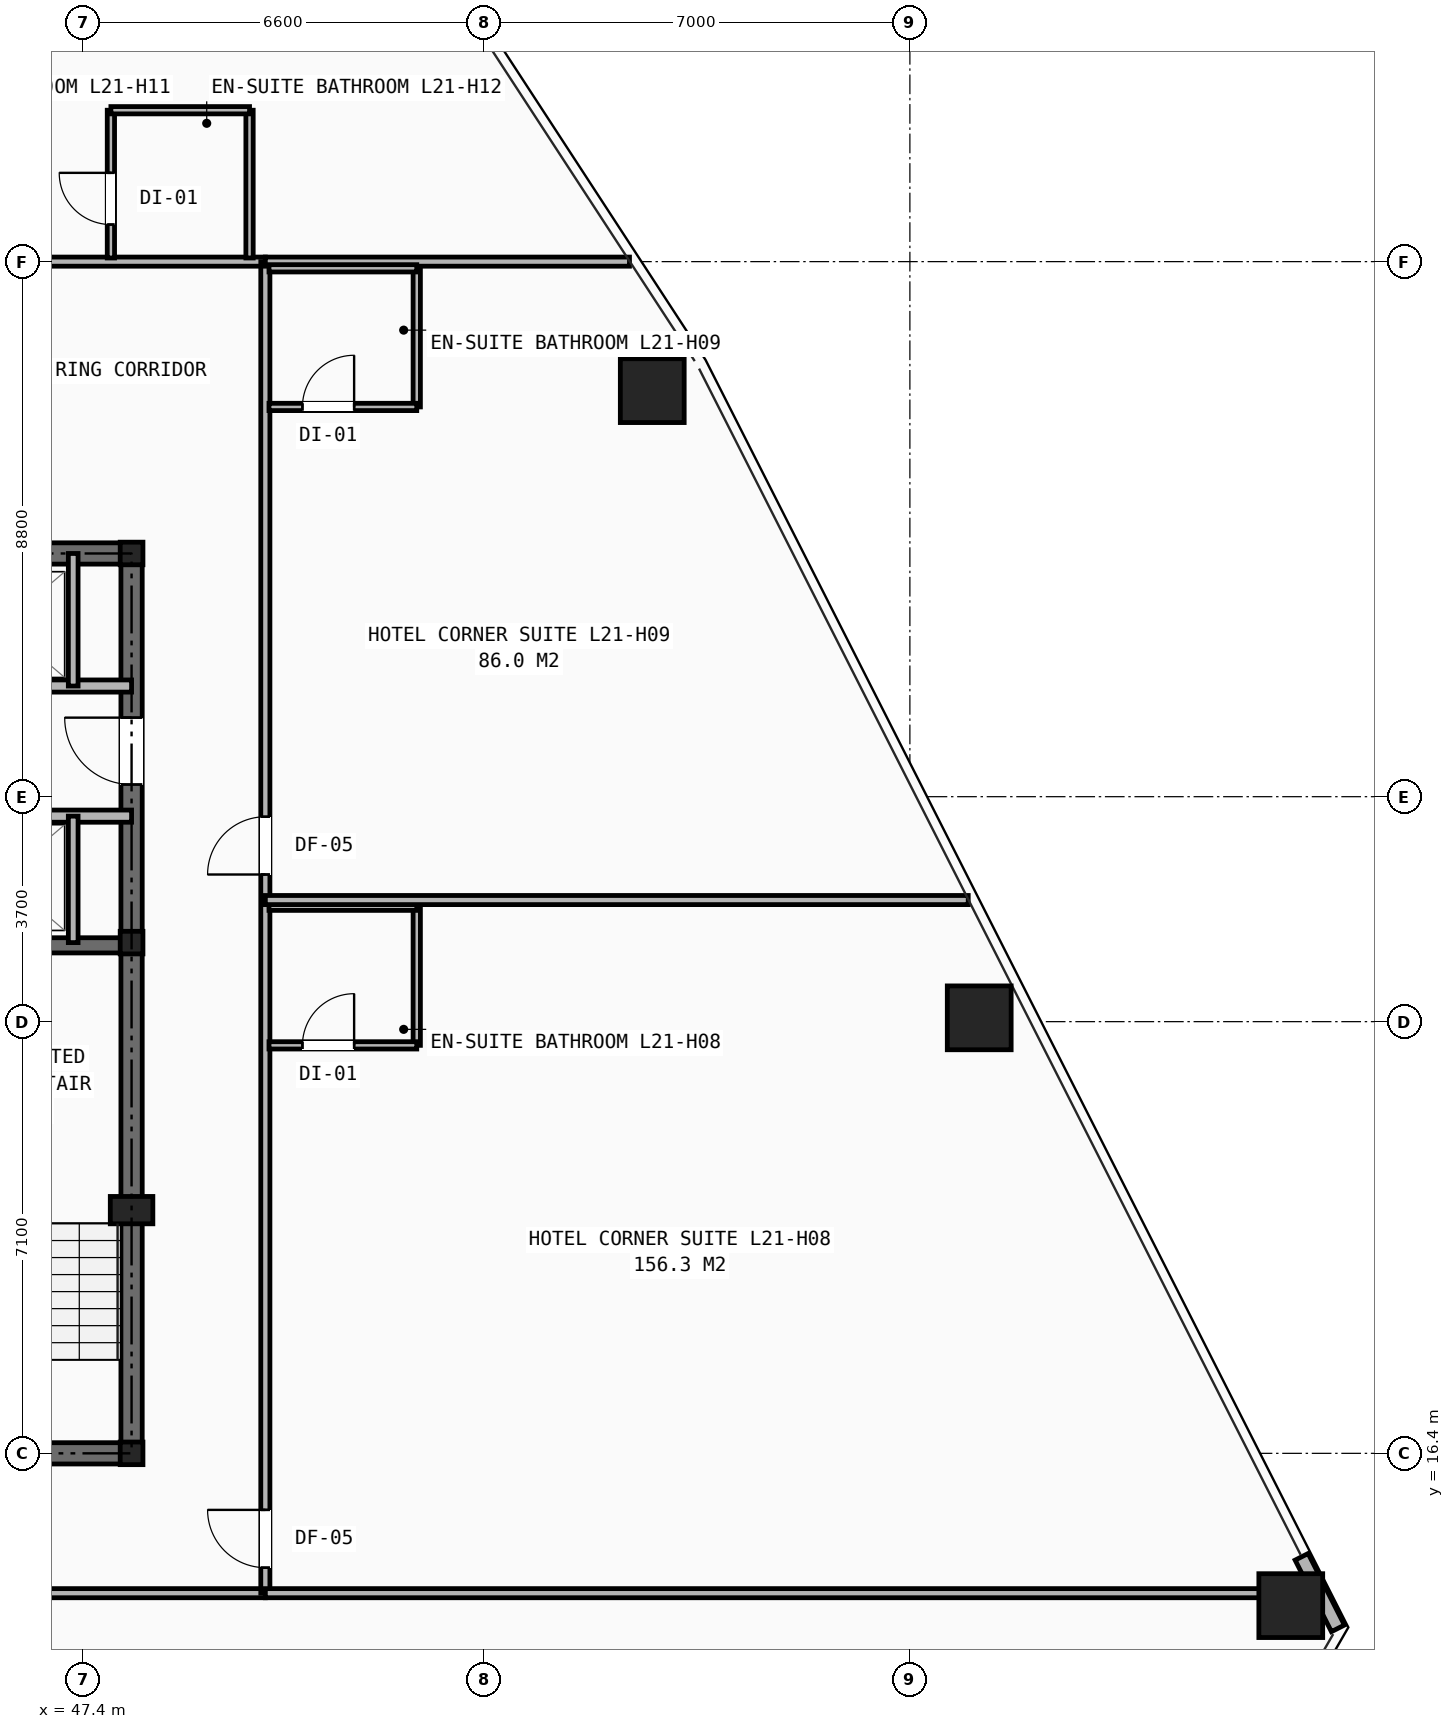
"""IFC4 building model, lengths in metres.
Left out: names, types, materials, properties, quantities, classifications, styles, units other than length and angle.
Written with IfcOpenShell. Run it as: python <this file> out.ifc"""

import sys

from ifc_helpers import new_model, si_unit, direction, frame, frame_2d, origin, origin_2d, place, context, subcontext, project, spatial, rectangle, hollow_rectangle, i_section, extrude, element, fill, save


model = new_model("IFC4")
c1 = context("Model", 3, precision=1e-05, world=origin(), true_north=direction((0.0, 1.0)))
c2 = subcontext(c1, "Body", "Model", "MODEL_VIEW")
j1 = project(units=[si_unit("LENGTHUNIT", "METRE"), si_unit("PLANEANGLEUNIT", "RADIAN")], contexts=[c1])
p1 = place(None, origin())
s1 = spatial("IfcSite", under=j1, at=p1, CompositionType="ELEMENT")
p2 = place(p1, origin())
s2 = spatial("IfcBuilding", under=s1, at=p2, CompositionType="ELEMENT")
p3 = place(p2, frame((0.0, 0.0, 76.6)))
s3 = spatial("IfcBuildingStorey", under=s2, at=p3, CompositionType="ELEMENT", Elevation=76.6)
for number, where, z_axis, x_axis in (
    (1, (48.2, 16.4, 0.0), (0.0, 0.0, 1.0), (1.0, 0.0, 0.0)),
    (2, (48.2, 24.8, 0.0), (0.0, 0.0, 1.0), (1.0, 0.0, 0.0)),
    (3, (48.2, 31.2, 0.0), (0.0, 0.0, 1.0), (1.0, 0.0, 0.0)),
):
    element("IfcColumn", number, at=place(p3, frame(where, z_axis=z_axis, x_axis=x_axis)), inside=s3, PredefinedType="COLUMN", context=c2, shape_type="SweptSolid", body=[
        extrude(i_section(OverallWidth=0.374, OverallDepth=0.372, WebThickness=0.016, FlangeThickness=0.026, at=origin_2d()), origin(), (0.0, 0.0, 1.0), 3.2),
    ])
p4 = place(p3, frame((48.2, 20.4, 0.0), z_axis=(0.0, 0.0, 1.0), x_axis=(1.0, 0.0, 0.0)))
e4 = element("IfcColumn", 4, at=p4, inside=s3, PredefinedType="PILASTER", context=c2, shape_type="SweptSolid", body=[
    extrude(rectangle(XDim=0.7, YDim=0.45, at=origin_2d()), origin(), (0.0, 0.0, 1.0), 3.2),
])
for number, where, z_axis, x_axis in (
    (5, (67.264, 13.896, 0.0), (0.0, 0.0, 1.0), (1.0, 0.0, 0.0)),
    (6, (62.14, 23.563, 0.0), (0.0, 0.0, 1.0), (1.0, 0.0, 0.0)),
    (7, (56.763, 33.878, 0.0), (0.0, 0.0, 1.0), (1.0, 0.0, 0.0)),
):
    element("IfcColumn", number, at=place(p3, frame(where, z_axis=z_axis, x_axis=x_axis)), inside=s3, PredefinedType="COLUMN", context=c2, shape_type="SweptSolid", body=[
        extrude(hollow_rectangle(XDim=1.05, YDim=1.05, WallThickness=0.07, at=origin_2d()), origin(), (0.0, 0.0, 1.0), 3.2),
    ])
p5 = place(p3, frame((68.04, 13.521, 0.0), z_axis=(0.0, 0.0, 1.0), x_axis=(-0.452239623624, 0.891896475396, 0.0)))
e8 = element("IfcWall", 8, at=p5, inside=s3, PredefinedType="SHEAR", context=c2, shape_type="SweptSolid", body=[
    extrude(rectangle(XDim=1.319, YDim=0.24, at=frame_2d((0.66, 0.0))), origin(), (0.0, 0.0, 1.0), 2.253),
])
p6 = place(p3, frame((31.8, 16.4, 0.0), z_axis=(0.0, 0.0, 1.0), x_axis=(1.0, 0.0, 0.0)))
e9 = element("IfcWall", 9, at=p6, inside=s3, PredefinedType="SHEAR", context=c2, shape_type="SweptSolid", body=[
    extrude(rectangle(XDim=16.4, YDim=0.35, at=frame_2d((8.2, 0.0))), origin(), (0.0, 0.0, 1.0), 2.97),
])
p7 = place(p6, frame((7.75, 0.0, 0.0)))
e10 = element("IfcOpeningElement", 10, at=p7, cuts=e9, PredefinedType="OPENING", context=c2, shape_type="SweptSolid", body=[
    extrude(rectangle(XDim=0.9, YDim=2.1, at=frame_2d((0.45, 1.05))), frame((0.0, 0.185, 0.0), z_axis=(0.0, -1.0, 0.0), x_axis=(1.0, 0.0, 0.0)), (0.0, 0.0, 1.0), 0.37),
])
p8 = place(p6, frame((4.2, 0.0, 0.0)))
e11 = element("IfcOpeningElement", 11, at=p8, cuts=e9, PredefinedType="OPENING", context=c2, shape_type="SweptSolid", body=[
    extrude(rectangle(XDim=0.95, YDim=2.1, at=frame_2d((0.475, 1.05))), frame((0.0, 0.185, 0.0), z_axis=(0.0, -1.0, 0.0), x_axis=(1.0, 0.0, 0.0)), (0.0, 0.0, 1.0), 0.37),
])
p9 = place(p6, frame((10.6, 0.0, 0.0)))
e12 = element("IfcOpeningElement", 12, at=p9, cuts=e9, PredefinedType="OPENING", context=c2, shape_type="SweptSolid", body=[
    extrude(rectangle(XDim=0.95, YDim=2.1, at=frame_2d((0.475, 1.05))), frame((0.0, 0.185, 0.0), z_axis=(0.0, -1.0, 0.0), x_axis=(1.0, 0.0, 0.0)), (0.0, 0.0, 1.0), 0.37),
])
p10 = place(p3, frame((31.8, 31.2, 0.0), z_axis=(0.0, 0.0, 1.0), x_axis=(1.0, 0.0, 0.0)))
e13 = element("IfcWall", 13, at=p10, inside=s3, PredefinedType="SHEAR", context=c2, shape_type="SweptSolid", body=[
    extrude(rectangle(XDim=16.4, YDim=0.35, at=frame_2d((8.2, 0.0))), origin(), (0.0, 0.0, 1.0), 2.97),
])
p11 = place(p3, frame((48.2, 16.4, 0.0), z_axis=(0.0, 0.0, 1.0), x_axis=(0.0, 1.0, 0.0)))
e14 = element("IfcWall", 14, at=p11, inside=s3, PredefinedType="SHEAR", context=c2, shape_type="SweptSolid", body=[
    extrude(rectangle(XDim=14.8, YDim=0.35, at=frame_2d((7.4, 0.0))), origin(), (0.0, 0.0, 1.0), 2.97),
])
p12 = place(p11, frame((11.0, 0.0, 0.0)))
e15 = element("IfcOpeningElement", 15, at=p12, cuts=e14, PredefinedType="OPENING", context=c2, shape_type="SweptSolid", body=[
    extrude(rectangle(XDim=1.1, YDim=2.15, at=frame_2d((0.55, 1.075))), frame((0.0, 0.185, 0.0), z_axis=(0.0, -1.0, 0.0), x_axis=(1.0, 0.0, 0.0)), (0.0, 0.0, 1.0), 0.37),
])
p13 = place(p3, frame((44.955, 24.755, 0.0), z_axis=(0.0, 0.0, 1.0), x_axis=(1.0, 0.0, 0.0)))
e16 = element("IfcWall", 16, at=p13, inside=s3, PredefinedType="SHEAR", context=c2, shape_type="SweptSolid", body=[
    extrude(rectangle(XDim=3.245, YDim=0.25, at=frame_2d((1.623, 0.0))), origin(), (0.0, 0.0, 1.0), 2.97),
])
p14 = place(p3, frame((33.82, 29.02, 0.0), z_axis=(0.0, 0.0, 1.0), x_axis=(1.0, 0.0, 0.0)))
e17 = element("IfcWall", 17, at=p14, inside=s3, PredefinedType="SOLIDWALL", context=c2, shape_type="SweptSolid", body=[
    extrude(rectangle(XDim=14.38, YDim=0.2, at=frame_2d((7.19, 0.0))), origin(), (0.0, 0.0, 1.0), 2.421),
])
p15 = place(p14, frame((0.53, 0.0, 0.0)))
e18 = element("IfcOpeningElement", 18, at=p15, cuts=e17, PredefinedType="OPENING", context=c2, shape_type="SweptSolid", body=[
    extrude(rectangle(XDim=1.1, YDim=2.15, at=frame_2d((0.55, 1.075))), frame((0.0, 0.11, 0.0), z_axis=(0.0, -1.0, 0.0), x_axis=(1.0, 0.0, 0.0)), (0.0, 0.0, 1.0), 0.22),
])
p16 = place(p14, frame((2.69, 0.0, 0.0)))
e19 = element("IfcOpeningElement", 19, at=p16, cuts=e17, PredefinedType="OPENING", context=c2, shape_type="SweptSolid", body=[
    extrude(rectangle(XDim=1.1, YDim=2.15, at=frame_2d((0.55, 1.075))), frame((0.0, 0.11, 0.0), z_axis=(0.0, -1.0, 0.0), x_axis=(1.0, 0.0, 0.0)), (0.0, 0.0, 1.0), 0.22),
])
p17 = place(p14, frame((4.85, 0.0, 0.0)))
e20 = element("IfcOpeningElement", 20, at=p17, cuts=e17, PredefinedType="OPENING", context=c2, shape_type="SweptSolid", body=[
    extrude(rectangle(XDim=1.1, YDim=2.15, at=frame_2d((0.55, 1.075))), frame((0.0, 0.11, 0.0), z_axis=(0.0, -1.0, 0.0), x_axis=(1.0, 0.0, 0.0)), (0.0, 0.0, 1.0), 0.22),
])
p18 = place(p14, frame((7.01, 0.0, 0.0)))
e21 = element("IfcOpeningElement", 21, at=p18, cuts=e17, PredefinedType="OPENING", context=c2, shape_type="SweptSolid", body=[
    extrude(rectangle(XDim=1.1, YDim=2.15, at=frame_2d((0.55, 1.075))), frame((0.0, 0.11, 0.0), z_axis=(0.0, -1.0, 0.0), x_axis=(1.0, 0.0, 0.0)), (0.0, 0.0, 1.0), 0.22),
])
p19 = place(p3, frame((31.8, 26.88, 0.0), z_axis=(0.0, 0.0, 1.0), x_axis=(1.0, 0.0, 0.0)))
e22 = element("IfcWall", 22, at=p19, inside=s3, PredefinedType="SOLIDWALL", context=c2, shape_type="SweptSolid", body=[
    extrude(rectangle(XDim=16.4, YDim=0.2, at=frame_2d((8.2, 0.0))), origin(), (0.0, 0.0, 1.0), 2.421),
])
p20 = place(p19, frame((0.55, 0.0, 0.0)))
e23 = element("IfcOpeningElement", 23, at=p20, cuts=e22, PredefinedType="OPENING", context=c2, shape_type="SweptSolid", body=[
    extrude(rectangle(XDim=0.85, YDim=2.05, at=frame_2d((0.425, 1.025))), frame((0.0, 0.11, 0.0), z_axis=(0.0, -1.0, 0.0), x_axis=(1.0, 0.0, 0.0)), (0.0, 0.0, 1.0), 0.22),
])
p21 = place(p3, frame((47.24, 29.02, 0.0), z_axis=(0.0, 0.0, 1.0), x_axis=(0.0, 1.0, 0.0)))
e24 = element("IfcWall", 24, at=p21, inside=s3, PredefinedType="SOLIDWALL", context=c2, shape_type="SweptSolid", body=[
    extrude(rectangle(XDim=2.18, YDim=0.16, at=frame_2d((1.09, 0.0))), origin(), (0.0, 0.0, 1.0), 2.421),
])
p22 = place(p3, frame((47.24, 24.8, 0.0), z_axis=(0.0, 0.0, 1.0), x_axis=(0.0, 1.0, 0.0)))
e25 = element("IfcWall", 25, at=p22, inside=s3, PredefinedType="SOLIDWALL", context=c2, shape_type="SweptSolid", body=[
    extrude(rectangle(XDim=2.08, YDim=0.16, at=frame_2d((1.04, 0.0))), origin(), (0.0, 0.0, 1.0), 2.97),
])
p23 = place(p3, frame((29.6, 14.1, 0.0), z_axis=(0.0, 0.0, 1.0), x_axis=(1.0, 0.0, 0.0)))
e26 = element("IfcWall", 26, at=p23, inside=s3, PredefinedType="PARTITIONING", context=c2, shape_type="SweptSolid", body=[
    extrude(rectangle(XDim=20.8, YDim=0.15, at=frame_2d((10.4, 0.0))), origin(), (0.0, 0.0, 1.0), 2.421),
])
p24 = place(p23, frame((0.57, 0.0, 0.0)))
e27 = element("IfcOpeningElement", 27, at=p24, cuts=e26, PredefinedType="OPENING", context=c2, shape_type="SweptSolid", body=[
    extrude(rectangle(XDim=0.95, YDim=2.1, at=frame_2d((0.475, 1.05))), frame((0.0, 0.085, 0.0), z_axis=(0.0, -1.0, 0.0), x_axis=(1.0, 0.0, 0.0)), (0.0, 0.0, 1.0), 0.17),
])
p25 = place(p23, frame((5.82, 0.0, 0.0)))
e28 = element("IfcOpeningElement", 28, at=p25, cuts=e26, PredefinedType="OPENING", context=c2, shape_type="SweptSolid", body=[
    extrude(rectangle(XDim=0.95, YDim=2.1, at=frame_2d((0.475, 1.05))), frame((0.0, 0.085, 0.0), z_axis=(0.0, -1.0, 0.0), x_axis=(1.0, 0.0, 0.0)), (0.0, 0.0, 1.0), 0.17),
])
p26 = place(p23, frame((15.02, 0.0, 0.0)))
e29 = element("IfcOpeningElement", 29, at=p26, cuts=e26, PredefinedType="OPENING", context=c2, shape_type="SweptSolid", body=[
    extrude(rectangle(XDim=0.95, YDim=2.1, at=frame_2d((0.475, 1.05))), frame((0.0, 0.085, 0.0), z_axis=(0.0, -1.0, 0.0), x_axis=(1.0, 0.0, 0.0)), (0.0, 0.0, 1.0), 0.17),
])
p27 = place(p3, frame((40.75, 36.0, 0.0), z_axis=(0.0, 0.0, 1.0), x_axis=(1.0, 0.0, 0.0)))
e30 = element("IfcWall", 30, at=p27, inside=s3, PredefinedType="PARTITIONING", context=c2, shape_type="SweptSolid", body=[
    extrude(rectangle(XDim=9.65, YDim=0.15, at=frame_2d((4.825, 0.0))), origin(), (0.0, 0.0, 1.0), 2.503),
])
p28 = place(p27, frame((3.47, 0.0, 0.0)))
e31 = element("IfcOpeningElement", 31, at=p28, cuts=e30, PredefinedType="OPENING", context=c2, shape_type="SweptSolid", body=[
    extrude(rectangle(XDim=0.95, YDim=2.1, at=frame_2d((0.475, 1.05))), frame((0.0, 0.085, 0.0), z_axis=(0.0, -1.0, 0.0), x_axis=(1.0, 0.0, 0.0)), (0.0, 0.0, 1.0), 0.17),
])
p29 = place(p3, frame((50.4, 14.1, 0.0), z_axis=(0.0, 0.0, 1.0), x_axis=(0.0, 1.0, 0.0)))
e32 = element("IfcWall", 32, at=p29, inside=s3, PredefinedType="PARTITIONING", context=c2, shape_type="SweptSolid", body=[
    extrude(rectangle(XDim=21.9, YDim=0.15, at=frame_2d((10.95, 0.0))), origin(), (0.0, 0.0, 1.0), 2.421),
])
p30 = place(p29, frame((0.42, 0.0, 0.0)))
e33 = element("IfcOpeningElement", 33, at=p30, cuts=e32, PredefinedType="OPENING", context=c2, shape_type="SweptSolid", body=[
    extrude(rectangle(XDim=0.95, YDim=2.1, at=frame_2d((0.475, 1.05))), frame((0.0, 0.085, 0.0), z_axis=(0.0, -1.0, 0.0), x_axis=(1.0, 0.0, 0.0)), (0.0, 0.0, 1.0), 0.17),
])
p31 = place(p29, frame((11.82, 0.0, 0.0)))
e34 = element("IfcOpeningElement", 34, at=p31, cuts=e32, PredefinedType="OPENING", context=c2, shape_type="SweptSolid", body=[
    extrude(rectangle(XDim=0.95, YDim=2.1, at=frame_2d((0.475, 1.05))), frame((0.0, 0.085, 0.0), z_axis=(0.0, -1.0, 0.0), x_axis=(1.0, 0.0, 0.0)), (0.0, 0.0, 1.0), 0.17),
])
p32 = place(p3, frame((50.4, 14.1, 0.0), z_axis=(0.0, 0.0, 1.0), x_axis=(1.0, 0.0, 0.0)))
e35 = element("IfcWall", 35, at=p32, inside=s3, PredefinedType="PARTITIONING", context=c2, shape_type="SweptSolid", body=[
    extrude(rectangle(XDim=17.341, YDim=0.15, at=frame_2d((8.67, 0.0))), origin(), (0.0, 0.0, 1.0), 2.258),
])
p33 = place(p3, frame((50.4, 36.0, 0.0), z_axis=(0.0, 0.0, 1.0), x_axis=(1.0, 0.0, 0.0)))
e36 = element("IfcWall", 36, at=p33, inside=s3, PredefinedType="PARTITIONING", context=c2, shape_type="SweptSolid", body=[
    extrude(rectangle(XDim=5.989, YDim=0.15, at=frame_2d((2.994, 0.0))), origin(), (0.0, 0.0, 1.0), 2.258),
])
p34 = place(p3, frame((52.89, 23.11, 0.0), z_axis=(0.0, 0.0, 1.0), x_axis=(0.0, 1.0, 0.0)))
e37 = element("IfcWall", 37, at=p34, inside=s3, PredefinedType="PARTITIONING", context=c2, shape_type="SweptSolid", body=[
    extrude(rectangle(XDim=2.28, YDim=0.12, at=frame_2d((1.14, 0.0))), origin(), (0.0, 0.0, 1.0), 2.97),
])
p35 = place(p3, frame((50.46, 23.11, 0.0), z_axis=(0.0, 0.0, 1.0), x_axis=(1.0, 0.0, 0.0)))
e38 = element("IfcWall", 38, at=p35, inside=s3, PredefinedType="PARTITIONING", context=c2, shape_type="SweptSolid", body=[
    extrude(rectangle(XDim=2.43, YDim=0.12, at=frame_2d((1.215, 0.0))), origin(), (0.0, 0.0, 1.0), 2.97),
])
p36 = place(p35, frame((0.55, 0.0, 0.0)))
e39 = element("IfcOpeningElement", 39, at=p36, cuts=e38, PredefinedType="OPENING", context=c2, shape_type="SweptSolid", body=[
    extrude(rectangle(XDim=0.85, YDim=2.05, at=frame_2d((0.425, 1.025))), frame((0.0, 0.07, 0.0), z_axis=(0.0, -1.0, 0.0), x_axis=(1.0, 0.0, 0.0)), (0.0, 0.0, 1.0), 0.14),
])
p37 = place(p3, frame((50.46, 25.39, 0.0), z_axis=(0.0, 0.0, 1.0), x_axis=(1.0, 0.0, 0.0)))
e40 = element("IfcWall", 40, at=p37, inside=s3, PredefinedType="PARTITIONING", context=c2, shape_type="SweptSolid", body=[
    extrude(rectangle(XDim=2.43, YDim=0.12, at=frame_2d((1.215, 0.0))), origin(), (0.0, 0.0, 1.0), 2.97),
])
p38 = place(p3, frame((50.4, 25.5, 0.0), z_axis=(0.0, 0.0, 1.0), x_axis=(1.0, 0.0, 0.0)))
e41 = element("IfcWall", 41, at=p38, inside=s3, PredefinedType="PARTITIONING", context=c2, shape_type="SweptSolid", body=[
    extrude(rectangle(XDim=11.56, YDim=0.15, at=frame_2d((5.78, 0.0))), origin(), (0.0, 0.0, 1.0), 2.258),
])
p39 = place(p3, frame((52.89, 33.61, 0.0), z_axis=(0.0, 0.0, 1.0), x_axis=(0.0, 1.0, 0.0)))
e42 = element("IfcWall", 42, at=p39, inside=s3, PredefinedType="PARTITIONING", context=c2, shape_type="SweptSolid", body=[
    extrude(rectangle(XDim=2.28, YDim=0.12, at=frame_2d((1.14, 0.0))), origin(), (0.0, 0.0, 1.0), 2.97),
])
p40 = place(p3, frame((50.46, 33.61, 0.0), z_axis=(0.0, 0.0, 1.0), x_axis=(1.0, 0.0, 0.0)))
e43 = element("IfcWall", 43, at=p40, inside=s3, PredefinedType="PARTITIONING", context=c2, shape_type="SweptSolid", body=[
    extrude(rectangle(XDim=2.43, YDim=0.12, at=frame_2d((1.215, 0.0))), origin(), (0.0, 0.0, 1.0), 2.503),
])
p41 = place(p40, frame((0.55, 0.0, 0.0)))
e44 = element("IfcOpeningElement", 44, at=p41, cuts=e43, PredefinedType="OPENING", context=c2, shape_type="SweptSolid", body=[
    extrude(rectangle(XDim=0.85, YDim=2.05, at=frame_2d((0.425, 1.025))), frame((0.0, 0.07, 0.0), z_axis=(0.0, -1.0, 0.0), x_axis=(1.0, 0.0, 0.0)), (0.0, 0.0, 1.0), 0.14),
])
p42 = place(p3, frame((50.46, 35.89, 0.0), z_axis=(0.0, 0.0, 1.0), x_axis=(1.0, 0.0, 0.0)))
e45 = element("IfcWall", 45, at=p42, inside=s3, PredefinedType="PARTITIONING", context=c2, shape_type="SweptSolid", body=[
    extrude(rectangle(XDim=2.43, YDim=0.12, at=frame_2d((1.215, 0.0))), origin(), (0.0, 0.0, 1.0), 2.97),
])
p43 = place(p3, frame((47.86, 36.06, 0.0), z_axis=(0.0, 0.0, 1.0), x_axis=(0.0, 1.0, 0.0)))
e46 = element("IfcWall", 46, at=p43, inside=s3, PredefinedType="PARTITIONING", context=c2, shape_type="SweptSolid", body=[
    extrude(rectangle(XDim=2.43, YDim=0.12, at=frame_2d((1.215, 0.0))), origin(), (0.0, 0.0, 1.0), 2.503),
])
p44 = place(p43, frame((0.55, 0.0, 0.0)))
e47 = element("IfcOpeningElement", 47, at=p44, cuts=e46, PredefinedType="OPENING", context=c2, shape_type="SweptSolid", body=[
    extrude(rectangle(XDim=0.85, YDim=2.05, at=frame_2d((0.425, 1.025))), frame((0.0, 0.07, 0.0), z_axis=(0.0, -1.0, 0.0), x_axis=(1.0, 0.0, 0.0)), (0.0, 0.0, 1.0), 0.14),
])
p45 = place(p3, frame((50.14, 36.06, 0.0), z_axis=(0.0, 0.0, 1.0), x_axis=(0.0, 1.0, 0.0)))
e48 = element("IfcWall", 48, at=p45, inside=s3, PredefinedType="PARTITIONING", context=c2, shape_type="SweptSolid", body=[
    extrude(rectangle(XDim=2.43, YDim=0.12, at=frame_2d((1.215, 0.0))), origin(), (0.0, 0.0, 1.0), 2.503),
])
p46 = place(p3, frame((47.86, 38.49, 0.0), z_axis=(0.0, 0.0, 1.0), x_axis=(1.0, 0.0, 0.0)))
e49 = element("IfcWall", 49, at=p46, inside=s3, PredefinedType="PARTITIONING", context=c2, shape_type="SweptSolid", body=[
    extrude(rectangle(XDim=2.28, YDim=0.12, at=frame_2d((1.14, 0.0))), origin(), (0.0, 0.0, 1.0), 2.503),
])
p47 = place(p12, origin())
e50 = element("IfcDoor", 50, at=p47, inside=s3, OperationType="SINGLE_SWING_RIGHT", PredefinedType="DOOR", context=c2, shape_type="SweptSolid", body=[
    extrude(rectangle(XDim=1.1, YDim=2.15, at=frame_2d((0.55, 1.075))), frame((0.0, 0.025, 0.0), z_axis=(0.0, -1.0, 0.0), x_axis=(1.0, 0.0, 0.0)), (0.0, 0.0, 1.0), 0.05),
])
fill(e15, e50)
p48 = place(p30, origin())
e51 = element("IfcDoor", 51, at=p48, inside=s3, OperationType="SINGLE_SWING_RIGHT", PredefinedType="DOOR", context=c2, shape_type="SweptSolid", body=[
    extrude(rectangle(XDim=0.95, YDim=2.1, at=frame_2d((0.475, 1.05))), frame((0.0, 0.025, 0.0), z_axis=(0.0, -1.0, 0.0), x_axis=(1.0, 0.0, 0.0)), (0.0, 0.0, 1.0), 0.05),
])
fill(e33, e51)
p49 = place(p36, origin())
e52 = element("IfcDoor", 52, at=p49, inside=s3, OperationType="SINGLE_SWING_RIGHT", PredefinedType="DOOR", context=c2, shape_type="SweptSolid", body=[
    extrude(rectangle(XDim=0.85, YDim=2.05, at=frame_2d((0.425, 1.025))), frame((0.0, 0.025, 0.0), z_axis=(0.0, -1.0, 0.0), x_axis=(1.0, 0.0, 0.0)), (0.0, 0.0, 1.0), 0.05),
])
fill(e39, e52)
p50 = place(p31, origin())
e53 = element("IfcDoor", 53, at=p50, inside=s3, OperationType="SINGLE_SWING_LEFT", PredefinedType="DOOR", context=c2, shape_type="SweptSolid", body=[
    extrude(rectangle(XDim=0.95, YDim=2.1, at=frame_2d((0.475, 1.05))), frame((0.0, 0.025, 0.0), z_axis=(0.0, -1.0, 0.0), x_axis=(1.0, 0.0, 0.0)), (0.0, 0.0, 1.0), 0.05),
])
fill(e34, e53)
p51 = place(p41, origin())
e54 = element("IfcDoor", 54, at=p51, inside=s3, OperationType="SINGLE_SWING_RIGHT", PredefinedType="DOOR", context=c2, shape_type="SweptSolid", body=[
    extrude(rectangle(XDim=0.85, YDim=2.05, at=frame_2d((0.425, 1.025))), frame((0.0, 0.025, 0.0), z_axis=(0.0, -1.0, 0.0), x_axis=(1.0, 0.0, 0.0)), (0.0, 0.0, 1.0), 0.05),
])
fill(e44, e54)
p52 = place(p44, origin())
e55 = element("IfcDoor", 55, at=p52, inside=s3, OperationType="SINGLE_SWING_RIGHT", PredefinedType="DOOR", context=c2, shape_type="SweptSolid", body=[
    extrude(rectangle(XDim=0.85, YDim=2.05, at=frame_2d((0.425, 1.025))), frame((0.0, 0.025, 0.0), z_axis=(0.0, -1.0, 0.0), x_axis=(1.0, 0.0, 0.0)), (0.0, 0.0, 1.0), 0.05),
])
fill(e47, e55)
save(model, sys.argv[1])
